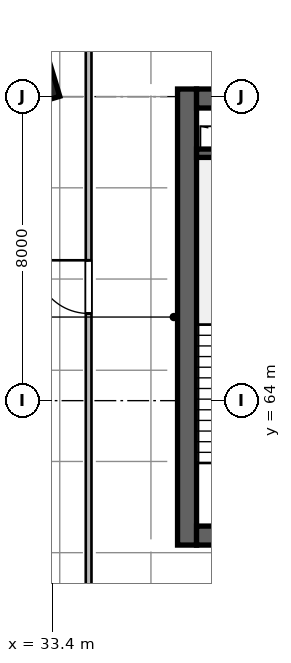
"""IFC4 building model, lengths in metres.
Left out: names, types, materials, properties, quantities, classifications, styles, units other than length and angle.
Written with IfcOpenShell. Run it as: python <this file> out.ifc"""

import sys

from ifc_helpers import new_model, si_unit, direction, frame, frame_2d, origin, origin_2d, place, context, subcontext, project, spatial, rectangle, extrude, source, transform, mapped, element, fill, save


model = new_model("IFC4")
c1 = context("Model", 3, precision=1e-05, world=origin(), true_north=direction((0.0, 1.0)))
c2 = subcontext(c1, "Body", "Model", "MODEL_VIEW")
j1 = project(units=[si_unit("LENGTHUNIT", "METRE"), si_unit("PLANEANGLEUNIT", "RADIAN")], contexts=[c1])
p1 = place(None, origin())
s1 = spatial("IfcSite", under=j1, at=p1, CompositionType="ELEMENT")
p2 = place(p1, origin())
s2 = spatial("IfcBuilding", under=s1, at=p2, CompositionType="ELEMENT")
p3 = place(p2, frame((0.0, 0.0, 91.2)))
s3 = spatial("IfcBuildingStorey", under=s2, at=p3, CompositionType="ELEMENT", Elevation=91.2)
m1 = source(origin(), c2, "Body", "SweptSolid", [
    extrude(rectangle(XDim=12.0, YDim=0.5, at=frame_2d((6.0, 0.0))), origin(), (0.0, 0.0, 1.0), 4.8),
])
p4 = place(p3, frame((36.95, 60.2, 0.0), z_axis=(0.0, 0.0, 1.0), x_axis=(0.0, 1.0, 0.0)))
e1 = element("IfcWall", 1, at=p4, inside=s3, PredefinedType="SHEAR", context=c2, shape_type="MappedRepresentation", body=[
    mapped(m1, transform((0.0, 0.0, 0.0), scale=1.0)),
])
m2 = source(origin(), c2, "Body", "SweptSolid", [
    extrude(rectangle(XDim=21.6, YDim=0.5, at=frame_2d((10.8, 0.0))), origin(), (0.0, 0.0, 1.0), 4.8),
])
p5 = place(p3, frame((37.2, 60.45, 0.0), z_axis=(0.0, 0.0, 1.0), x_axis=(1.0, 0.0, 0.0)))
e2 = element("IfcWall", 2, at=p5, inside=s3, PredefinedType="SHEAR", context=c2, shape_type="MappedRepresentation", body=[
    mapped(m2, transform((0.0, 0.0, 0.0), scale=1.0)),
])
p6 = place(p5, frame((1.1, 0.0, 0.0)))
e3 = element("IfcOpeningElement", 3, at=p6, cuts=e2, PredefinedType="OPENING", context=c2, shape_type="SweptSolid", body=[
    extrude(rectangle(XDim=1.15, YDim=2.15, at=frame_2d((0.575, 1.075))), frame((0.0, 0.26, 0.0), z_axis=(0.0, -1.0, 0.0), x_axis=(1.0, 0.0, 0.0)), (0.0, 0.0, 1.0), 0.52),
])
p7 = place(p5, frame((19.5, 0.0, 0.0)))
e4 = element("IfcOpeningElement", 4, at=p7, cuts=e2, PredefinedType="OPENING", context=c2, shape_type="SweptSolid", body=[
    extrude(rectangle(XDim=0.9, YDim=2.1, at=frame_2d((0.45, 1.05))), frame((0.0, 0.26, 0.0), z_axis=(0.0, -1.0, 0.0), x_axis=(1.0, 0.0, 0.0)), (0.0, 0.0, 1.0), 0.52),
])
p8 = place(p5, frame((12.02, 0.0, 0.0)))
e5 = element("IfcOpeningElement", 5, at=p8, cuts=e2, PredefinedType="OPENING", context=c2, shape_type="SweptSolid", body=[
    extrude(rectangle(XDim=1.6, YDim=2.15, at=frame_2d((0.8, 1.075))), frame((0.0, 0.26, 0.0), z_axis=(0.0, -1.0, 0.0), x_axis=(1.0, 0.0, 0.0)), (0.0, 0.0, 1.0), 0.52),
])
p9 = place(p3, frame((37.2, 71.95, 0.0), z_axis=(0.0, 0.0, 1.0), x_axis=(1.0, 0.0, 0.0)))
e6 = element("IfcWall", 6, at=p9, inside=s3, PredefinedType="SHEAR", context=c2, shape_type="MappedRepresentation", body=[
    mapped(m2, transform((0.0, 0.0, 0.0), scale=1.0)),
])
p10 = place(p9, frame((1.2, 0.0, 0.0)))
e7 = element("IfcOpeningElement", 7, at=p10, cuts=e6, PredefinedType="OPENING", context=c2, shape_type="SweptSolid", body=[
    extrude(rectangle(XDim=0.9, YDim=2.1, at=frame_2d((0.45, 1.05))), frame((0.0, 0.26, 0.0), z_axis=(0.0, -1.0, 0.0), x_axis=(1.0, 0.0, 0.0)), (0.0, 0.0, 1.0), 0.52),
])
p11 = place(p9, frame((14.7, 0.0, 0.0)))
e8 = element("IfcOpeningElement", 8, at=p11, cuts=e6, PredefinedType="OPENING", context=c2, shape_type="SweptSolid", body=[
    extrude(rectangle(XDim=1.2, YDim=2.15, at=frame_2d((0.6, 1.075))), frame((0.0, 0.26, 0.0), z_axis=(0.0, -1.0, 0.0), x_axis=(1.0, 0.0, 0.0)), (0.0, 0.0, 1.0), 0.52),
])
p12 = place(p9, frame((4.15, 0.0, 0.0)))
e9 = element("IfcOpeningElement", 9, at=p12, cuts=e6, PredefinedType="OPENING", context=c2, shape_type="SweptSolid", body=[
    extrude(rectangle(XDim=1.3, YDim=2.15, at=frame_2d((0.65, 1.075))), frame((0.0, 0.26, 0.0), z_axis=(0.0, -1.0, 0.0), x_axis=(1.0, 0.0, 0.0)), (0.0, 0.0, 1.0), 0.52),
])
p13 = place(p9, frame((7.25, 0.0, 0.0)))
e10 = element("IfcOpeningElement", 10, at=p13, cuts=e6, PredefinedType="OPENING", context=c2, shape_type="SweptSolid", body=[
    extrude(rectangle(XDim=0.9, YDim=2.1, at=frame_2d((0.45, 1.05))), frame((0.0, 0.26, 0.0), z_axis=(0.0, -1.0, 0.0), x_axis=(1.0, 0.0, 0.0)), (0.0, 0.0, 1.0), 0.52),
])
m3 = source(origin(), c2, "Body", "SweptSolid", [
    extrude(rectangle(XDim=3.27, YDim=0.22, at=frame_2d((1.635, 0.0))), origin(), (0.0, 0.0, 1.0), 4.8),
])
p14 = place(p3, frame((37.2, 70.51, 0.0), z_axis=(0.0, 0.0, 1.0), x_axis=(1.0, 0.0, 0.0)))
e11 = element("IfcWall", 11, at=p14, inside=s3, PredefinedType="SHEAR", context=c2, shape_type="MappedRepresentation", body=[
    mapped(m3, transform((0.0, 0.0, 0.0), scale=1.0)),
])
m4 = source(origin(), c2, "Body", "SweptSolid", [
    extrude(rectangle(XDim=1.3, YDim=1.3, at=origin_2d()), origin(), (0.0, 0.0, 1.0), 4.8),
])
p15 = place(p3, frame((32.791, 72.442, 0.0), z_axis=(0.0, 0.0, 1.0), x_axis=(-0.288697611798, 0.957420330337, 0.0)))
e12 = element("IfcColumn", 12, at=p15, inside=s3, PredefinedType="COLUMN", context=c2, shape_type="MappedRepresentation", body=[
    mapped(m4, transform((0.0, 0.0, 0.0), scale=1.0)),
])
m5 = source(origin(), c2, "Body", "SweptSolid", [
    extrude(rectangle(XDim=18.067, YDim=0.15, at=frame_2d((9.034, 0.0))), origin(), (0.0, 0.0, 1.0), 4.55),
])
p16 = place(p3, frame((34.36, 57.96, 0.0), z_axis=(0.0, 0.0, 1.0), x_axis=(0.0, 1.0, 0.0)))
e13 = element("IfcWall", 13, at=p16, inside=s3, PredefinedType="PARTITIONING", context=c2, shape_type="MappedRepresentation", body=[
    mapped(m5, transform((0.0, 0.0, 0.0), scale=1.0)),
])
p17 = place(p16, frame((8.333, 0.0, 0.0)))
e14 = element("IfcOpeningElement", 14, at=p17, cuts=e13, PredefinedType="OPENING", context=c2, shape_type="SweptSolid", body=[
    extrude(rectangle(XDim=1.4, YDim=2.15, at=frame_2d((0.7, 1.075))), frame((0.0, 0.085, 0.0), z_axis=(0.0, -1.0, 0.0), x_axis=(1.0, 0.0, 0.0)), (0.0, 0.0, 1.0), 0.17),
])
m6 = source(origin(), c2, "Body", "SweptSolid", [
    extrude(rectangle(XDim=1.4, YDim=2.15, at=frame_2d((0.7, 1.075))), frame((0.0, 0.025, 0.0), z_axis=(0.0, -1.0, 0.0), x_axis=(1.0, 0.0, 0.0)), (0.0, 0.0, 1.0), 0.05),
])
p18 = place(p17, origin())
e15 = element("IfcDoor", 15, at=p18, inside=s3, OperationType="SINGLE_SWING_RIGHT", PredefinedType="DOOR", context=c2, shape_type="MappedRepresentation", body=[
    mapped(m6, transform((0.0, 0.0, 0.0), scale=1.0)),
])
fill(e14, e15)
save(model, sys.argv[1])
